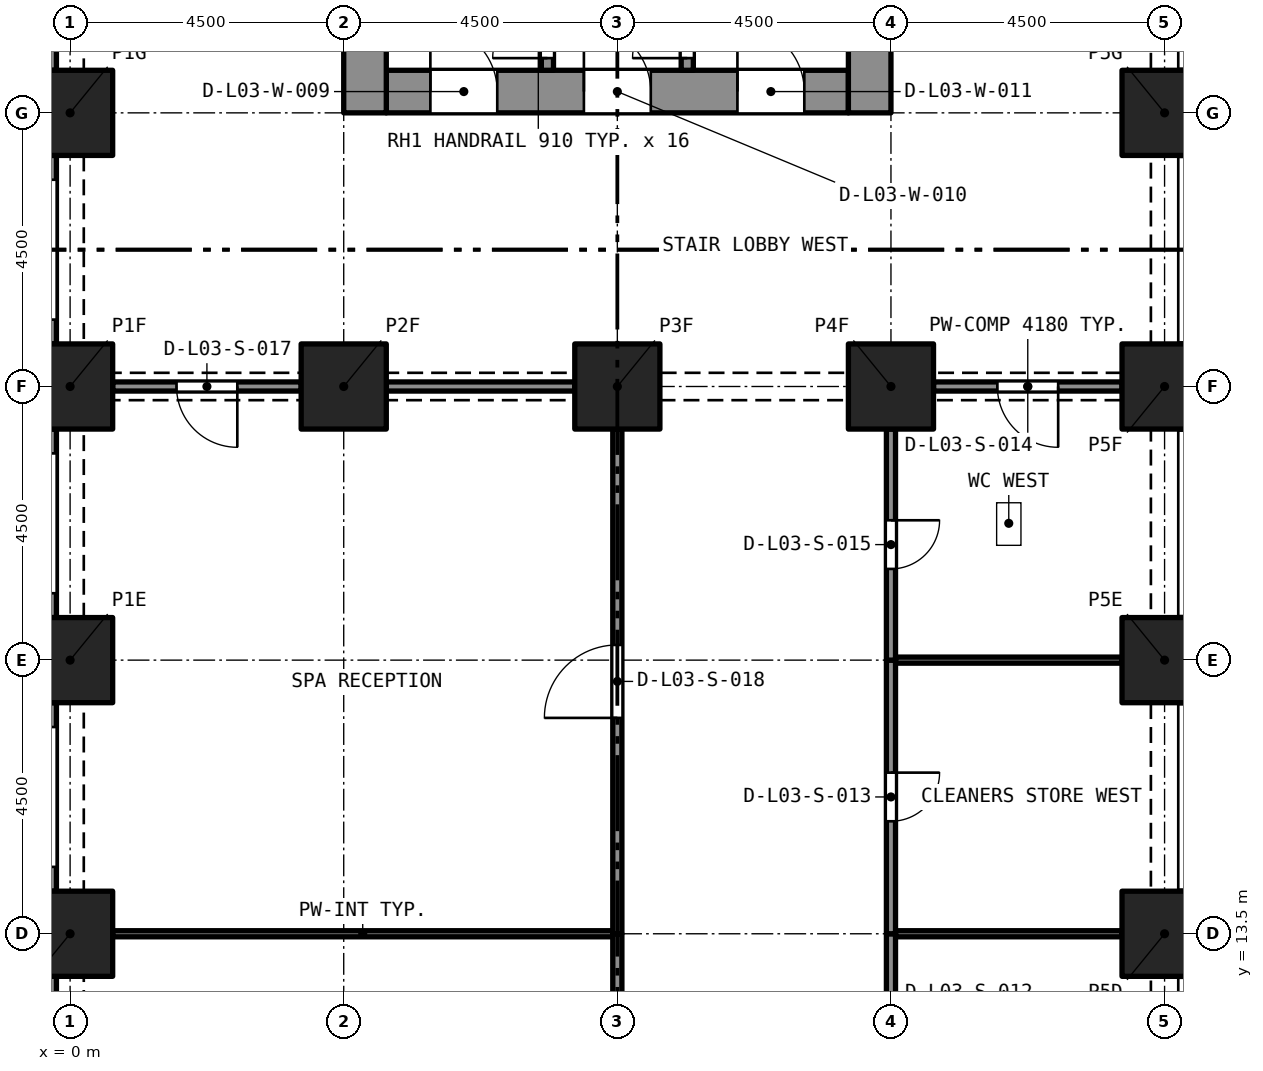
"""IFC4 building model, lengths in metres.
Left out: names, types, materials, properties, quantities, classifications, styles, units other than length and angle.
Written with IfcOpenShell. Run it as: python <this file> out.ifc"""

import sys

from ifc_helpers import new_model, si_unit, direction, frame, frame_2d, origin, origin_2d, place, context, subcontext, project, spatial, rectangle, extrude, element, fill, save


model = new_model("IFC4")
c1 = context("Model", 3, precision=1e-05, world=origin(), true_north=direction((0.0, 1.0)))
c2 = subcontext(c1, "Body", "Model", "MODEL_VIEW")
j1 = project(units=[si_unit("LENGTHUNIT", "METRE"), si_unit("PLANEANGLEUNIT", "RADIAN")], contexts=[c1])
p1 = place(None, origin())
s1 = spatial("IfcSite", under=j1, at=p1, CompositionType="ELEMENT")
p2 = place(p1, origin())
s2 = spatial("IfcBuilding", under=s1, at=p2, CompositionType="ELEMENT")
p3 = place(p2, frame((0.0, 0.0, 16.0)))
s3 = spatial("IfcBuildingStorey", under=s2, at=p3, CompositionType="ELEMENT", Elevation=16.0)
for number, where, z_axis, x_axis in (
    (1, (0.0, 13.5, 0.0), (0.0, 0.0, 1.0), (1.0, 0.0, 0.0)),
    (2, (18.0, 13.5, 0.0), (0.0, 0.0, 1.0), (1.0, 0.0, 0.0)),
    (3, (0.0, 18.0, 0.0), (0.0, 0.0, 1.0), (1.0, 0.0, 0.0)),
    (4, (18.0, 18.0, 0.0), (0.0, 0.0, 1.0), (1.0, 0.0, 0.0)),
    (5, (0.0, 22.5, 0.0), (0.0, 0.0, 1.0), (1.0, 0.0, 0.0)),
    (6, (4.5, 22.5, 0.0), (0.0, 0.0, 1.0), (1.0, 0.0, 0.0)),
    (7, (9.0, 22.5, 0.0), (0.0, 0.0, 1.0), (1.0, 0.0, 0.0)),
    (8, (13.5, 22.5, 0.0), (0.0, 0.0, 1.0), (1.0, 0.0, 0.0)),
    (9, (18.0, 22.5, 0.0), (0.0, 0.0, 1.0), (1.0, 0.0, 0.0)),
    (10, (0.0, 27.0, 0.0), (0.0, 0.0, 1.0), (1.0, 0.0, 0.0)),
    (11, (18.0, 27.0, 0.0), (0.0, 0.0, 1.0), (1.0, 0.0, 0.0)),
):
    element("IfcColumn", number, at=place(p3, frame(where, z_axis=z_axis, x_axis=x_axis)), inside=s3, PredefinedType="COLUMN", context=c2, shape_type="SweptSolid", body=[
        extrude(rectangle(XDim=1.4, YDim=1.4, at=origin_2d()), origin(), (0.0, 0.0, 1.0), 5.0),
    ])
p4 = place(p3, frame((5.2, 27.35, 0.0), z_axis=(0.0, 0.0, 1.0), x_axis=(1.0, 0.0, 0.0)))
e12 = element("IfcWall", 12, at=p4, inside=s3, PredefinedType="SOLIDWALL", context=c2, shape_type="SweptSolid", body=[
    extrude(rectangle(XDim=7.6, YDim=0.7, at=frame_2d((3.8, 0.0))), origin(), (0.0, 0.0, 1.0), 5.0),
])
p5 = place(p4, frame((0.725, 0.0, 0.0)))
e13 = element("IfcOpeningElement", 13, at=p5, cuts=e12, PredefinedType="OPENING", context=c2, shape_type="SweptSolid", body=[
    extrude(rectangle(XDim=1.1, YDim=2.1, at=frame_2d((0.55, 1.05))), frame((0.0, 0.36, 0.0), z_axis=(0.0, -1.0, 0.0), x_axis=(1.0, 0.0, 0.0)), (0.0, 0.0, 1.0), 0.72),
])
p6 = place(p4, frame((3.25, 0.0, 0.0)))
e14 = element("IfcOpeningElement", 14, at=p6, cuts=e12, PredefinedType="OPENING", context=c2, shape_type="SweptSolid", body=[
    extrude(rectangle(XDim=1.1, YDim=2.1, at=frame_2d((0.55, 1.05))), frame((0.0, 0.36, 0.0), z_axis=(0.0, -1.0, 0.0), x_axis=(1.0, 0.0, 0.0)), (0.0, 0.0, 1.0), 0.72),
])
p7 = place(p4, frame((5.775, 0.0, 0.0)))
e15 = element("IfcOpeningElement", 15, at=p7, cuts=e12, PredefinedType="OPENING", context=c2, shape_type="SweptSolid", body=[
    extrude(rectangle(XDim=1.1, YDim=2.1, at=frame_2d((0.55, 1.05))), frame((0.0, 0.36, 0.0), z_axis=(0.0, -1.0, 0.0), x_axis=(1.0, 0.0, 0.0)), (0.0, 0.0, 1.0), 0.72),
])
p8 = place(p3, frame((4.85, 27.0, 0.0), z_axis=(0.0, 0.0, 1.0), x_axis=(0.0, 1.0, 0.0)))
e16 = element("IfcWall", 16, at=p8, inside=s3, PredefinedType="SOLIDWALL", context=c2, shape_type="SweptSolid", body=[
    extrude(rectangle(XDim=13.5, YDim=0.7, at=frame_2d((6.75, 0.0))), origin(), (0.0, 0.0, 1.0), 5.0),
])
p9 = place(p8, frame((8.95, 0.0, 0.0)))
e17 = element("IfcOpeningElement", 17, at=p9, cuts=e16, PredefinedType="OPENING", context=c2, shape_type="SweptSolid", body=[
    extrude(rectangle(XDim=1.2, YDim=2.1, at=frame_2d((0.6, 1.05))), frame((0.0, 0.36, 0.0), z_axis=(0.0, -1.0, 0.0), x_axis=(1.0, 0.0, 0.0)), (0.0, 0.0, 1.0), 0.72),
])
p10 = place(p3, frame((13.15, 27.0, 0.0), z_axis=(0.0, 0.0, 1.0), x_axis=(0.0, 1.0, 0.0)))
e18 = element("IfcWall", 18, at=p10, inside=s3, PredefinedType="SOLIDWALL", context=c2, shape_type="SweptSolid", body=[
    extrude(rectangle(XDim=13.5, YDim=0.7, at=frame_2d((6.75, 0.0))), origin(), (0.0, 0.0, 1.0), 5.0),
])
p11 = place(p10, frame((11.1, 0.0, 0.0)))
e19 = element("IfcOpeningElement", 19, at=p11, cuts=e18, PredefinedType="OPENING", context=c2, shape_type="SweptSolid", body=[
    extrude(rectangle(XDim=1.1, YDim=2.1, at=frame_2d((0.55, 1.05))), frame((0.0, 0.36, 0.0), z_axis=(0.0, -1.0, 0.0), x_axis=(1.0, 0.0, 0.0)), (0.0, 0.0, 1.0), 0.72),
])
p12 = place(p10, frame((8.95, 0.0, 0.0)))
e20 = element("IfcOpeningElement", 20, at=p12, cuts=e18, PredefinedType="OPENING", context=c2, shape_type="SweptSolid", body=[
    extrude(rectangle(XDim=1.2, YDim=2.1, at=frame_2d((0.6, 1.05))), frame((0.0, 0.36, 0.0), z_axis=(0.0, -1.0, 0.0), x_axis=(1.0, 0.0, 0.0)), (0.0, 0.0, 1.0), 0.72),
])
p13 = place(p3, frame((-0.375, 27.7, 0.0), z_axis=(0.0, 0.0, 1.0), x_axis=(0.0, 1.0, 0.0)))
e21 = element("IfcWall", 21, at=p13, inside=s3, PredefinedType="SOLIDWALL", context=c2, shape_type="SweptSolid", body=[
    extrude(rectangle(XDim=3.1, YDim=0.3, at=frame_2d((1.55, 0.0))), origin(), (0.0, 0.0, 1.0), 5.0),
])
p14 = place(p13, frame((0.4, 0.0, 0.45)))
e22 = element("IfcOpeningElement", 22, at=p14, cuts=e21, PredefinedType="OPENING", context=c2, shape_type="SweptSolid", body=[
    extrude(rectangle(XDim=2.3, YDim=3.3, at=frame_2d((1.15, 1.65))), frame((0.0, 0.16, 0.0), z_axis=(0.0, -1.0, 0.0), x_axis=(1.0, 0.0, 0.0)), (0.0, 0.0, 1.0), 0.32),
])
p15 = place(p3, frame((-0.375, 23.2, 0.0), z_axis=(0.0, 0.0, 1.0), x_axis=(0.0, 1.0, 0.0)))
e23 = element("IfcWall", 23, at=p15, inside=s3, PredefinedType="SOLIDWALL", context=c2, shape_type="SweptSolid", body=[
    extrude(rectangle(XDim=3.1, YDim=0.3, at=frame_2d((1.55, 0.0))), origin(), (0.0, 0.0, 1.0), 5.0),
])
p16 = place(p15, frame((0.4, 0.0, 0.45)))
e24 = element("IfcOpeningElement", 24, at=p16, cuts=e23, PredefinedType="OPENING", context=c2, shape_type="SweptSolid", body=[
    extrude(rectangle(XDim=2.3, YDim=3.3, at=frame_2d((1.15, 1.65))), frame((0.0, 0.16, 0.0), z_axis=(0.0, -1.0, 0.0), x_axis=(1.0, 0.0, 0.0)), (0.0, 0.0, 1.0), 0.32),
])
p17 = place(p3, frame((-0.375, 18.7, 0.0), z_axis=(0.0, 0.0, 1.0), x_axis=(0.0, 1.0, 0.0)))
e25 = element("IfcWall", 25, at=p17, inside=s3, PredefinedType="SOLIDWALL", context=c2, shape_type="SweptSolid", body=[
    extrude(rectangle(XDim=3.1, YDim=0.3, at=frame_2d((1.55, 0.0))), origin(), (0.0, 0.0, 1.0), 5.0),
])
p18 = place(p17, frame((0.4, 0.0, 0.45)))
e26 = element("IfcOpeningElement", 26, at=p18, cuts=e25, PredefinedType="OPENING", context=c2, shape_type="SweptSolid", body=[
    extrude(rectangle(XDim=2.3, YDim=3.3, at=frame_2d((1.15, 1.65))), frame((0.0, 0.16, 0.0), z_axis=(0.0, -1.0, 0.0), x_axis=(1.0, 0.0, 0.0)), (0.0, 0.0, 1.0), 0.32),
])
p19 = place(p3, frame((-0.375, 14.2, 0.0), z_axis=(0.0, 0.0, 1.0), x_axis=(0.0, 1.0, 0.0)))
e27 = element("IfcWall", 27, at=p19, inside=s3, PredefinedType="SOLIDWALL", context=c2, shape_type="SweptSolid", body=[
    extrude(rectangle(XDim=3.1, YDim=0.3, at=frame_2d((1.55, 0.0))), origin(), (0.0, 0.0, 1.0), 5.0),
])
p20 = place(p19, frame((0.4, 0.0, 0.45)))
e28 = element("IfcOpeningElement", 28, at=p20, cuts=e27, PredefinedType="OPENING", context=c2, shape_type="SweptSolid", body=[
    extrude(rectangle(XDim=2.3, YDim=3.3, at=frame_2d((1.15, 1.65))), frame((0.0, 0.16, 0.0), z_axis=(0.0, -1.0, 0.0), x_axis=(1.0, 0.0, 0.0)), (0.0, 0.0, 1.0), 0.32),
])
p21 = place(p3, frame((-0.375, 9.7, 0.0), z_axis=(0.0, 0.0, 1.0), x_axis=(0.0, 1.0, 0.0)))
e29 = element("IfcWall", 29, at=p21, inside=s3, PredefinedType="SOLIDWALL", context=c2, shape_type="SweptSolid", body=[
    extrude(rectangle(XDim=3.1, YDim=0.3, at=frame_2d((1.55, 0.0))), origin(), (0.0, 0.0, 1.0), 5.0),
])
p22 = place(p21, frame((0.4, 0.0, 0.45)))
e30 = element("IfcOpeningElement", 30, at=p22, cuts=e29, PredefinedType="OPENING", context=c2, shape_type="SweptSolid", body=[
    extrude(rectangle(XDim=2.3, YDim=3.3, at=frame_2d((1.15, 1.65))), frame((0.0, 0.16, 0.0), z_axis=(0.0, -1.0, 0.0), x_axis=(1.0, 0.0, 0.0)), (0.0, 0.0, 1.0), 0.32),
])
p23 = place(p3, frame((7.85, 27.7, 0.0), z_axis=(0.0, 0.0, 1.0), x_axis=(0.0, 1.0, 0.0)))
e31 = element("IfcWall", 31, at=p23, inside=s3, PredefinedType="SOLIDWALL", context=c2, shape_type="SweptSolid", body=[
    extrude(rectangle(XDim=5.4, YDim=0.2, at=frame_2d((2.7, 0.0))), origin(), (0.0, 0.0, 1.0), 4.65),
])
p24 = place(p23, frame((0.2, 0.0, 0.0)))
e32 = element("IfcOpeningElement", 32, at=p24, cuts=e31, PredefinedType="OPENING", context=c2, shape_type="SweptSolid", body=[
    extrude(rectangle(XDim=0.9, YDim=2.1, at=frame_2d((0.45, 1.05))), frame((0.0, 0.11, 0.0), z_axis=(0.0, -1.0, 0.0), x_axis=(1.0, 0.0, 0.0)), (0.0, 0.0, 1.0), 0.22),
])
p25 = place(p3, frame((10.15, 27.7, 0.0), z_axis=(0.0, 0.0, 1.0), x_axis=(0.0, 1.0, 0.0)))
e33 = element("IfcWall", 33, at=p25, inside=s3, PredefinedType="SOLIDWALL", context=c2, shape_type="SweptSolid", body=[
    extrude(rectangle(XDim=5.4, YDim=0.2, at=frame_2d((2.7, 0.0))), origin(), (0.0, 0.0, 1.0), 4.65),
])
p26 = place(p25, frame((0.2, 0.0, 0.0)))
e34 = element("IfcOpeningElement", 34, at=p26, cuts=e33, PredefinedType="OPENING", context=c2, shape_type="SweptSolid", body=[
    extrude(rectangle(XDim=0.9, YDim=2.1, at=frame_2d((0.45, 1.05))), frame((0.0, 0.11, 0.0), z_axis=(0.0, -1.0, 0.0), x_axis=(1.0, 0.0, 0.0)), (0.0, 0.0, 1.0), 0.22),
])
p27 = place(p3, frame((13.575, 13.5, 0.0), z_axis=(0.0, 0.0, 1.0), x_axis=(1.0, 0.0, 0.0)))
e35 = element("IfcWall", 35, at=p27, inside=s3, PredefinedType="PARTITIONING", context=c2, shape_type="SweptSolid", body=[
    extrude(rectangle(XDim=3.725, YDim=0.1, at=frame_2d((1.863, 0.0))), origin(), (0.0, 0.0, 1.0), 4.65),
])
p28 = place(p3, frame((13.5, 13.5, 0.0), z_axis=(0.0, 0.0, 1.0), x_axis=(0.0, -1.0, 0.0)))
e36 = element("IfcWall", 36, at=p28, inside=s3, PredefinedType="PARTITIONING", context=c2, shape_type="SweptSolid", body=[
    extrude(rectangle(XDim=4.5, YDim=0.15, at=frame_2d((2.25, 0.0))), origin(), (0.0, 0.0, 1.0), 4.65),
])
p29 = place(p28, frame((1.85, 0.0, 0.0)))
e37 = element("IfcOpeningElement", 37, at=p29, cuts=e36, PredefinedType="OPENING", context=c2, shape_type="SweptSolid", body=[
    extrude(rectangle(XDim=0.8, YDim=2.1, at=frame_2d((0.4, 1.05))), frame((0.0, 0.085, 0.0), z_axis=(0.0, -1.0, 0.0), x_axis=(1.0, 0.0, 0.0)), (0.0, 0.0, 1.0), 0.17),
])
p30 = place(p3, frame((13.575, 18.0, 0.0), z_axis=(0.0, 0.0, 1.0), x_axis=(1.0, 0.0, 0.0)))
e38 = element("IfcWall", 38, at=p30, inside=s3, PredefinedType="PARTITIONING", context=c2, shape_type="SweptSolid", body=[
    extrude(rectangle(XDim=3.725, YDim=0.1, at=frame_2d((1.863, 0.0))), origin(), (0.0, 0.0, 1.0), 4.65),
])
p31 = place(p3, frame((13.5, 18.0, 0.0), z_axis=(0.0, 0.0, 1.0), x_axis=(0.0, -1.0, 0.0)))
e39 = element("IfcWall", 39, at=p31, inside=s3, PredefinedType="PARTITIONING", context=c2, shape_type="SweptSolid", body=[
    extrude(rectangle(XDim=4.5, YDim=0.15, at=frame_2d((2.25, 0.0))), origin(), (0.0, 0.0, 1.0), 4.65),
])
p32 = place(p31, frame((1.85, 0.0, 0.0)))
e40 = element("IfcOpeningElement", 40, at=p32, cuts=e39, PredefinedType="OPENING", context=c2, shape_type="SweptSolid", body=[
    extrude(rectangle(XDim=0.8, YDim=2.1, at=frame_2d((0.4, 1.05))), frame((0.0, 0.085, 0.0), z_axis=(0.0, -1.0, 0.0), x_axis=(1.0, 0.0, 0.0)), (0.0, 0.0, 1.0), 0.17),
])
p33 = place(p3, frame((17.3, 22.5, 0.0), z_axis=(0.0, 0.0, 1.0), x_axis=(-1.0, 0.0, 0.0)))
e41 = element("IfcWall", 41, at=p33, inside=s3, PredefinedType="PARTITIONING", context=c2, shape_type="SweptSolid", body=[
    extrude(rectangle(XDim=3.1, YDim=0.15, at=frame_2d((1.55, 0.0))), origin(), (0.0, 0.0, 1.0), 4.18),
])
p34 = place(p33, frame((1.05, 0.0, 0.0)))
e42 = element("IfcOpeningElement", 42, at=p34, cuts=e41, PredefinedType="OPENING", context=c2, shape_type="SweptSolid", body=[
    extrude(rectangle(XDim=1.0, YDim=2.1, at=frame_2d((0.5, 1.05))), frame((0.0, 0.085, 0.0), z_axis=(0.0, -1.0, 0.0), x_axis=(1.0, 0.0, 0.0)), (0.0, 0.0, 1.0), 0.17),
])
p35 = place(p3, frame((13.5, 21.8, 0.0), z_axis=(0.0, 0.0, 1.0), x_axis=(0.0, -1.0, 0.0)))
e43 = element("IfcWall", 43, at=p35, inside=s3, PredefinedType="PARTITIONING", context=c2, shape_type="SweptSolid", body=[
    extrude(rectangle(XDim=3.8, YDim=0.15, at=frame_2d((1.9, 0.0))), origin(), (0.0, 0.0, 1.0), 4.65),
])
p36 = place(p35, frame((1.5, 0.0, 0.0)))
e44 = element("IfcOpeningElement", 44, at=p36, cuts=e43, PredefinedType="OPENING", context=c2, shape_type="SweptSolid", body=[
    extrude(rectangle(XDim=0.8, YDim=2.1, at=frame_2d((0.4, 1.05))), frame((0.0, 0.085, 0.0), z_axis=(0.0, -1.0, 0.0), x_axis=(1.0, 0.0, 0.0)), (0.0, 0.0, 1.0), 0.17),
])
p37 = place(p3, frame((0.7, 13.5, 0.0), z_axis=(0.0, 0.0, 1.0), x_axis=(1.0, 0.0, 0.0)))
e45 = element("IfcWall", 45, at=p37, inside=s3, PredefinedType="PARTITIONING", context=c2, shape_type="SweptSolid", body=[
    extrude(rectangle(XDim=8.225, YDim=0.1, at=frame_2d((4.113, 0.0))), origin(), (0.0, 0.0, 1.0), 4.65),
])
p38 = place(p3, frame((9.0, 0.7, 0.0), z_axis=(0.0, 0.0, 1.0), x_axis=(0.0, 1.0, 0.0)))
e46 = element("IfcWall", 46, at=p38, inside=s3, PredefinedType="PARTITIONING", context=c2, shape_type="SweptSolid", body=[
    extrude(rectangle(XDim=12.8, YDim=0.15, at=frame_2d((6.4, 0.0))), origin(), (0.0, 0.0, 1.0), 4.65),
])
p39 = place(p38, frame((5.8, 0.0, 0.0)))
e47 = element("IfcOpeningElement", 47, at=p39, cuts=e46, PredefinedType="OPENING", context=c2, shape_type="SweptSolid", body=[
    extrude(rectangle(XDim=1.2, YDim=2.1, at=frame_2d((0.6, 1.05))), frame((0.0, 0.085, 0.0), z_axis=(0.0, -1.0, 0.0), x_axis=(1.0, 0.0, 0.0)), (0.0, 0.0, 1.0), 0.17),
])
p40 = place(p3, frame((3.8, 22.5, 0.0), z_axis=(0.0, 0.0, 1.0), x_axis=(-1.0, 0.0, 0.0)))
e48 = element("IfcWall", 48, at=p40, inside=s3, PredefinedType="PARTITIONING", context=c2, shape_type="SweptSolid", body=[
    extrude(rectangle(XDim=3.1, YDim=0.15, at=frame_2d((1.55, 0.0))), origin(), (0.0, 0.0, 1.0), 4.18),
])
p41 = place(p40, frame((1.05, 0.0, 0.0)))
e49 = element("IfcOpeningElement", 49, at=p41, cuts=e48, PredefinedType="OPENING", context=c2, shape_type="SweptSolid", body=[
    extrude(rectangle(XDim=1.0, YDim=2.1, at=frame_2d((0.5, 1.05))), frame((0.0, 0.085, 0.0), z_axis=(0.0, -1.0, 0.0), x_axis=(1.0, 0.0, 0.0)), (0.0, 0.0, 1.0), 0.17),
])
p42 = place(p3, frame((5.2, 22.5, 0.0), z_axis=(0.0, 0.0, 1.0), x_axis=(1.0, 0.0, 0.0)))
e50 = element("IfcWall", 50, at=p42, inside=s3, PredefinedType="PARTITIONING", context=c2, shape_type="SweptSolid", body=[
    extrude(rectangle(XDim=3.1, YDim=0.15, at=frame_2d((1.55, 0.0))), origin(), (0.0, 0.0, 1.0), 4.18),
])
p43 = place(p3, frame((9.0, 13.5, 0.0), z_axis=(0.0, 0.0, 1.0), x_axis=(0.0, 1.0, 0.0)))
e51 = element("IfcWall", 51, at=p43, inside=s3, PredefinedType="PARTITIONING", context=c2, shape_type="SweptSolid", body=[
    extrude(rectangle(XDim=8.3, YDim=0.15, at=frame_2d((4.15, 0.0))), origin(), (0.0, 0.0, 1.0), 4.65),
])
p44 = place(p43, frame((3.55, 0.0, 0.0)))
e52 = element("IfcOpeningElement", 52, at=p44, cuts=e51, PredefinedType="OPENING", context=c2, shape_type="SweptSolid", body=[
    extrude(rectangle(XDim=1.2, YDim=2.1, at=frame_2d((0.6, 1.05))), frame((0.0, 0.085, 0.0), z_axis=(0.0, -1.0, 0.0), x_axis=(1.0, 0.0, 0.0)), (0.0, 0.0, 1.0), 0.17),
])
p45 = place(p24, origin())
e53 = element("IfcDoor", 53, at=p45, inside=s3, OperationType="SINGLE_SWING_LEFT", PredefinedType="DOOR", context=c2, shape_type="SweptSolid", body=[
    extrude(rectangle(XDim=0.9, YDim=2.1, at=frame_2d((0.45, 1.05))), frame((0.0, 0.025, 0.0), z_axis=(0.0, -1.0, 0.0), x_axis=(1.0, 0.0, 0.0)), (0.0, 0.0, 1.0), 0.05),
])
fill(e32, e53)
p46 = place(p26, origin())
e54 = element("IfcDoor", 54, at=p46, inside=s3, OperationType="SINGLE_SWING_LEFT", PredefinedType="DOOR", context=c2, shape_type="SweptSolid", body=[
    extrude(rectangle(XDim=0.9, YDim=2.1, at=frame_2d((0.45, 1.05))), frame((0.0, 0.025, 0.0), z_axis=(0.0, -1.0, 0.0), x_axis=(1.0, 0.0, 0.0)), (0.0, 0.0, 1.0), 0.05),
])
fill(e34, e54)
p47 = place(p5, origin())
e55 = element("IfcDoor", 55, at=p47, inside=s3, OperationType="SINGLE_SWING_LEFT", PredefinedType="DOOR", context=c2, shape_type="SweptSolid", body=[
    extrude(rectangle(XDim=1.1, YDim=2.1, at=frame_2d((0.55, 1.05))), frame((0.0, 0.025, 0.0), z_axis=(0.0, -1.0, 0.0), x_axis=(1.0, 0.0, 0.0)), (0.0, 0.0, 1.0), 0.05),
])
fill(e13, e55)
p48 = place(p6, origin())
e56 = element("IfcDoor", 56, at=p48, inside=s3, OperationType="SINGLE_SWING_LEFT", PredefinedType="DOOR", context=c2, shape_type="SweptSolid", body=[
    extrude(rectangle(XDim=1.1, YDim=2.1, at=frame_2d((0.55, 1.05))), frame((0.0, 0.025, 0.0), z_axis=(0.0, -1.0, 0.0), x_axis=(1.0, 0.0, 0.0)), (0.0, 0.0, 1.0), 0.05),
])
fill(e14, e56)
p49 = place(p7, origin())
e57 = element("IfcDoor", 57, at=p49, inside=s3, OperationType="SINGLE_SWING_LEFT", PredefinedType="DOOR", context=c2, shape_type="SweptSolid", body=[
    extrude(rectangle(XDim=1.1, YDim=2.1, at=frame_2d((0.55, 1.05))), frame((0.0, 0.025, 0.0), z_axis=(0.0, -1.0, 0.0), x_axis=(1.0, 0.0, 0.0)), (0.0, 0.0, 1.0), 0.05),
])
fill(e15, e57)
p50 = place(p32, origin())
e58 = element("IfcDoor", 58, at=p50, inside=s3, OperationType="SINGLE_SWING_RIGHT", PredefinedType="DOOR", context=c2, shape_type="SweptSolid", body=[
    extrude(rectangle(XDim=0.8, YDim=2.1, at=frame_2d((0.4, 1.05))), frame((0.0, 0.025, 0.0), z_axis=(0.0, -1.0, 0.0), x_axis=(1.0, 0.0, 0.0)), (0.0, 0.0, 1.0), 0.05),
])
fill(e40, e58)
p51 = place(p34, origin())
e59 = element("IfcDoor", 59, at=p51, inside=s3, OperationType="SINGLE_SWING_RIGHT", PredefinedType="DOOR", context=c2, shape_type="SweptSolid", body=[
    extrude(rectangle(XDim=1.0, YDim=2.1, at=frame_2d((0.5, 1.05))), frame((0.0, 0.025, 0.0), z_axis=(0.0, -1.0, 0.0), x_axis=(1.0, 0.0, 0.0)), (0.0, 0.0, 1.0), 0.05),
])
fill(e42, e59)
p52 = place(p36, origin())
e60 = element("IfcDoor", 60, at=p52, inside=s3, OperationType="SINGLE_SWING_RIGHT", PredefinedType="DOOR", context=c2, shape_type="SweptSolid", body=[
    extrude(rectangle(XDim=0.8, YDim=2.1, at=frame_2d((0.4, 1.05))), frame((0.0, 0.025, 0.0), z_axis=(0.0, -1.0, 0.0), x_axis=(1.0, 0.0, 0.0)), (0.0, 0.0, 1.0), 0.05),
])
fill(e44, e60)
p53 = place(p41, origin())
e61 = element("IfcDoor", 61, at=p53, inside=s3, OperationType="SINGLE_SWING_RIGHT", PredefinedType="DOOR", context=c2, shape_type="SweptSolid", body=[
    extrude(rectangle(XDim=1.0, YDim=2.1, at=frame_2d((0.5, 1.05))), frame((0.0, 0.025, 0.0), z_axis=(0.0, -1.0, 0.0), x_axis=(1.0, 0.0, 0.0)), (0.0, 0.0, 1.0), 0.05),
])
fill(e49, e61)
p54 = place(p44, origin())
e62 = element("IfcDoor", 62, at=p54, inside=s3, OperationType="SINGLE_SWING_RIGHT", PredefinedType="DOOR", context=c2, shape_type="SweptSolid", body=[
    extrude(rectangle(XDim=1.2, YDim=2.1, at=frame_2d((0.6, 1.05))), frame((0.0, 0.025, 0.0), z_axis=(0.0, -1.0, 0.0), x_axis=(1.0, 0.0, 0.0)), (0.0, 0.0, 1.0), 0.05),
])
fill(e52, e62)
save(model, sys.argv[1])
